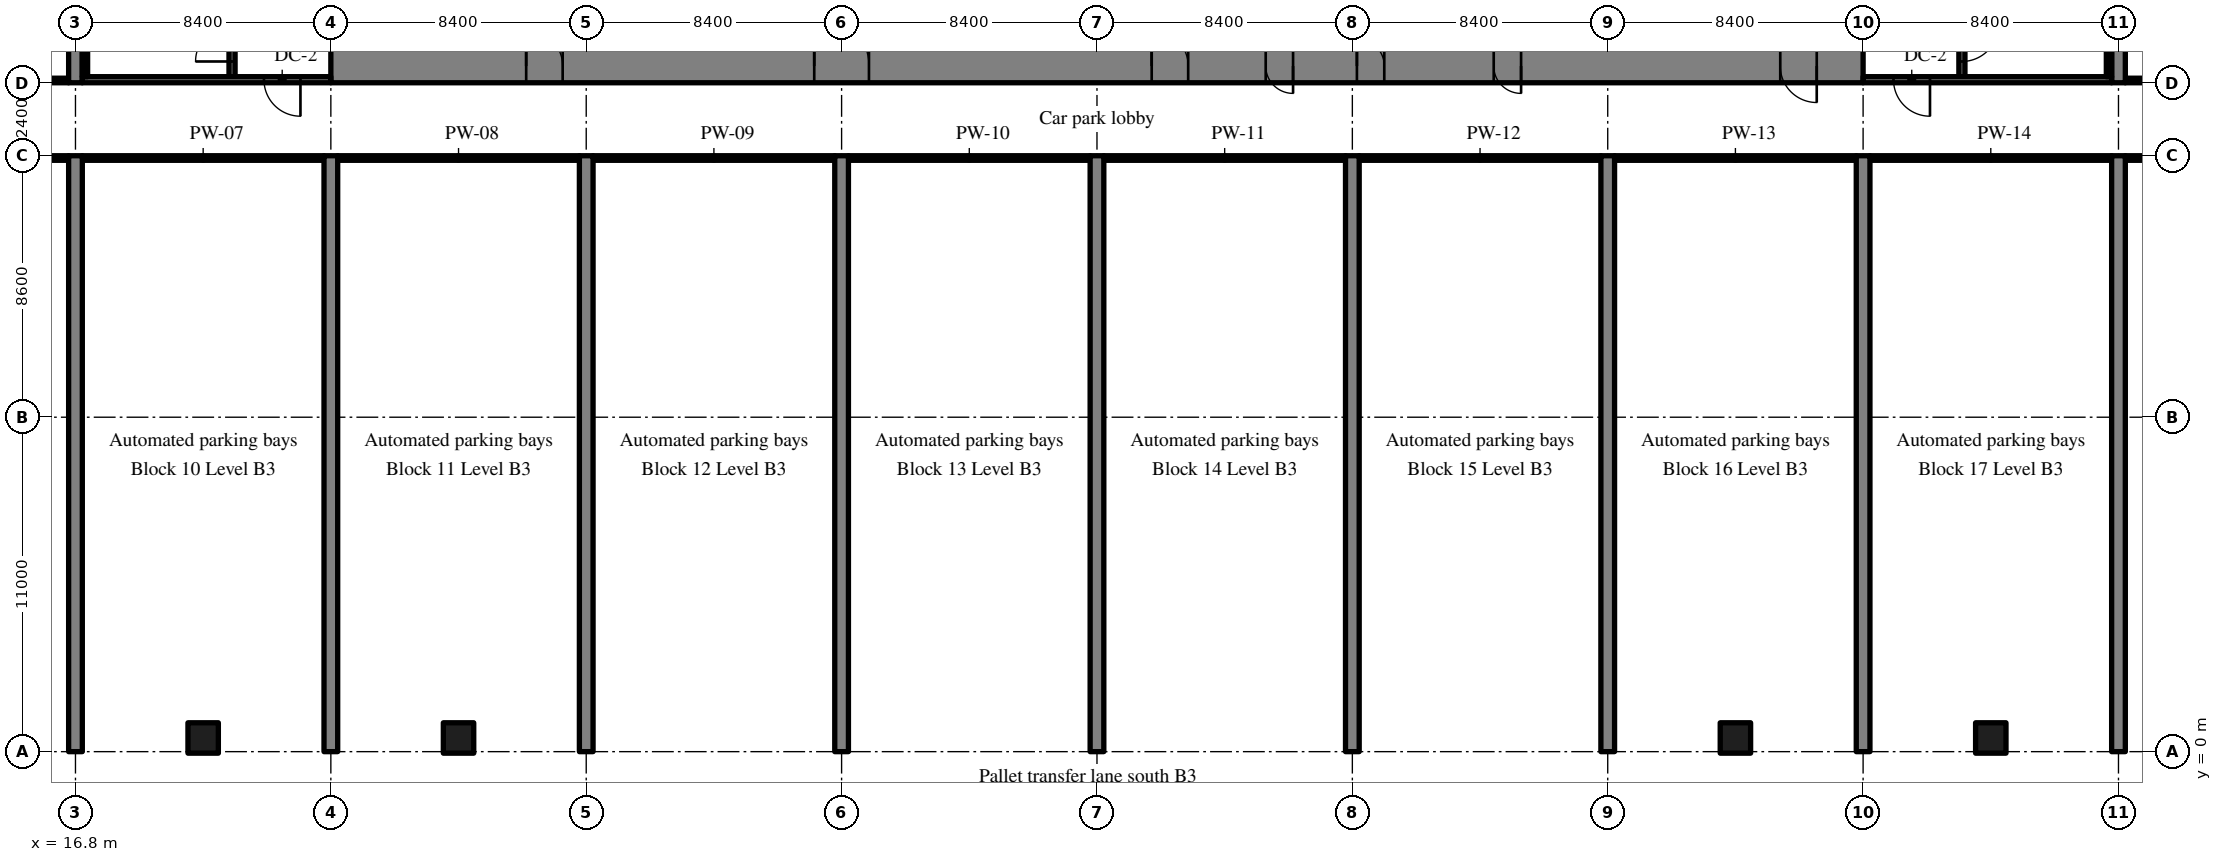
"""IFC4 building model, lengths in metres.
Left out: names, types, materials, properties, quantities, classifications, styles, units other than length and angle.
Written with IfcOpenShell. Run it as: python <this file> out.ifc"""

import sys

from ifc_helpers import new_model, si_unit, direction, frame, frame_2d, origin, origin_2d, place, context, subcontext, project, spatial, rectangle, extrude, source, transform, mapped, element, fill, save


model = new_model("IFC4")
c1 = context("Model", 3, precision=1e-05, world=origin(), true_north=direction((0.0, 1.0)))
c2 = subcontext(c1, "Body", "Model", "MODEL_VIEW")
j1 = project(units=[si_unit("LENGTHUNIT", "METRE"), si_unit("PLANEANGLEUNIT", "RADIAN")], contexts=[c1])
p1 = place(None, origin())
s1 = spatial("IfcSite", under=j1, at=p1, CompositionType="ELEMENT")
p2 = place(p1, origin())
s2 = spatial("IfcBuilding", under=s1, at=p2, CompositionType="ELEMENT")
p3 = place(p2, frame((0.0, 0.0, -13.5)))
s3 = spatial("IfcBuildingStorey", under=s2, at=p3, CompositionType="ELEMENT", Elevation=-13.5)
m1 = source(origin(), c2, "Body", "SweptSolid", [
    extrude(rectangle(XDim=50.4, YDim=1.1, at=frame_2d((25.2, 0.0))), origin(), (0.0, 0.0, 1.0), 4.52),
])
p4 = place(p3, frame((25.2, 22.55, -0.3), z_axis=(0.0, 0.0, 1.0), x_axis=(1.0, 0.0, 0.0)))
e1 = element("IfcWall", 1, at=p4, inside=s3, PredefinedType="SHEAR", context=c2, shape_type="MappedRepresentation", body=[
    mapped(m1, transform((0.0, 0.0, 0.0), scale=1.0)),
])
m2 = source(origin(), c2, "Body", "SweptSolid", [
    extrude(rectangle(XDim=1.8, YDim=2.1, at=frame_2d((0.9, 1.05))), frame((0.0, 0.56, 0.0), z_axis=(0.0, -1.0, 0.0), x_axis=(1.0, 0.0, 0.0)), (0.0, 0.0, 1.0), 1.12),
])
p5 = place(p4, frame((15.9, 0.0, 0.0)))
e2 = element("IfcOpeningElement", 2, at=p5, cuts=e1, PredefinedType="OPENING", context=c2, shape_type="MappedRepresentation", body=[
    mapped(m2, transform((0.0, 0.0, 0.0), scale=1.0)),
])
m3 = source(origin(), c2, "Body", "SweptSolid", [
    extrude(rectangle(XDim=1.2, YDim=2.1, at=frame_2d((0.6, 1.05))), frame((0.0, 0.56, 0.0), z_axis=(0.0, -1.0, 0.0), x_axis=(1.0, 0.0, 0.0)), (0.0, 0.0, 1.0), 1.12),
])
p6 = place(p4, frame((27.0, 0.0, 0.0)))
e3 = element("IfcOpeningElement", 3, at=p6, cuts=e1, PredefinedType="OPENING", context=c2, shape_type="MappedRepresentation", body=[
    mapped(m3, transform((0.0, 0.0, 0.0), scale=1.0)),
])
m4 = source(origin(), c2, "Body", "SweptSolid", [
    extrude(rectangle(XDim=0.9, YDim=2.1, at=frame_2d((0.45, 1.05))), frame((0.0, 0.56, 0.0), z_axis=(0.0, -1.0, 0.0), x_axis=(1.0, 0.0, 0.0)), (0.0, 0.0, 1.0), 1.12),
])
p7 = place(p4, frame((33.75, 0.0, 0.0)))
e4 = element("IfcOpeningElement", 4, at=p7, cuts=e1, PredefinedType="OPENING", context=c2, shape_type="MappedRepresentation", body=[
    mapped(m4, transform((0.0, 0.0, 0.0), scale=1.0)),
])
p8 = place(p4, frame((30.75, 0.0, 0.0)))
e5 = element("IfcOpeningElement", 5, at=p8, cuts=e1, PredefinedType="OPENING", context=c2, shape_type="MappedRepresentation", body=[
    mapped(m4, transform((0.0, 0.0, 0.0), scale=1.0)),
])
p9 = place(p4, frame((38.25, 0.0, 0.0)))
e6 = element("IfcOpeningElement", 6, at=p9, cuts=e1, PredefinedType="OPENING", context=c2, shape_type="MappedRepresentation", body=[
    mapped(m4, transform((0.0, 0.0, 0.0), scale=1.0)),
])
p10 = place(p4, frame((6.425, 0.0, 0.0)))
e7 = element("IfcOpeningElement", 7, at=p10, cuts=e1, PredefinedType="OPENING", context=c2, shape_type="MappedRepresentation", body=[
    mapped(m3, transform((0.0, 0.0, 0.0), scale=1.0)),
])
p11 = place(p4, frame((47.675, 0.0, 0.0)))
e8 = element("IfcOpeningElement", 8, at=p11, cuts=e1, PredefinedType="OPENING", context=c2, shape_type="MappedRepresentation", body=[
    mapped(m3, transform((0.0, 0.0, 0.0), scale=1.0)),
])
m5 = source(origin(), c2, "Body", "SweptSolid", [
    extrude(rectangle(XDim=19.6, YDim=0.45, at=frame_2d((9.8, 0.0))), origin(), (0.0, 0.0, 1.0), 4.52),
])
p12 = place(p3, frame((16.8, 0.0, -0.3), z_axis=(0.0, 0.0, 1.0), x_axis=(0.0, 1.0, 0.0)))
e9 = element("IfcWall", 9, at=p12, inside=s3, PredefinedType="SHEAR", context=c2, shape_type="MappedRepresentation", body=[
    mapped(m5, transform((0.0, 0.0, 0.0), scale=1.0)),
])
m6 = source(origin(), c2, "Body", "SweptSolid", [
    extrude(rectangle(XDim=20.0, YDim=0.45, at=frame_2d((10.0, 0.0))), origin(), (0.0, 0.0, 1.0), 4.52),
])
p13 = place(p3, frame((16.8, 22.0, -0.3), z_axis=(0.0, 0.0, 1.0), x_axis=(0.0, 1.0, 0.0)))
e10 = element("IfcWall", 10, at=p13, inside=s3, PredefinedType="SHEAR", context=c2, shape_type="MappedRepresentation", body=[
    mapped(m6, transform((0.0, 0.0, 0.0), scale=1.0)),
])
for number, where, z_axis, x_axis in (
    (11, (25.2, 0.0, -0.3), (0.0, 0.0, 1.0), (0.0, 1.0, 0.0)),
    (12, (33.6, 0.0, -0.3), (0.0, 0.0, 1.0), (0.0, 1.0, 0.0)),
    (13, (42.0, 0.0, -0.3), (0.0, 0.0, 1.0), (0.0, 1.0, 0.0)),
    (14, (50.4, 0.0, -0.3), (0.0, 0.0, 1.0), (0.0, 1.0, 0.0)),
    (15, (58.8, 0.0, -0.3), (0.0, 0.0, 1.0), (0.0, 1.0, 0.0)),
    (16, (67.2, 0.0, -0.3), (0.0, 0.0, 1.0), (0.0, 1.0, 0.0)),
    (17, (75.6, 0.0, -0.3), (0.0, 0.0, 1.0), (0.0, 1.0, 0.0)),
    (18, (84.0, 0.0, -0.3), (0.0, 0.0, 1.0), (0.0, 1.0, 0.0)),
):
    element("IfcWall", number, at=place(p3, frame(where, z_axis=z_axis, x_axis=x_axis)), inside=s3, PredefinedType="SHEAR", context=c2, shape_type="MappedRepresentation", body=[
        mapped(m5, transform((0.0, 0.0, 0.0), scale=1.0)),
    ])
p14 = place(p3, frame((84.0, 22.0, -0.3), z_axis=(0.0, 0.0, 1.0), x_axis=(0.0, 1.0, 0.0)))
e19 = element("IfcWall", 19, at=p14, inside=s3, PredefinedType="SHEAR", context=c2, shape_type="MappedRepresentation", body=[
    mapped(m6, transform((0.0, 0.0, 0.0), scale=1.0)),
])
m7 = source(origin(), c2, "Body", "SweptSolid", [
    extrude(rectangle(XDim=1.0, YDim=1.0, at=origin_2d()), origin(), (0.0, 0.0, 1.0), 4.52),
])
for number, where, z_axis, x_axis in (
    (20, (21.0, 0.45, -0.3), (0.0, 0.0, 1.0), (1.0, 0.0, 0.0)),
    (21, (29.4, 0.45, -0.3), (0.0, 0.0, 1.0), (1.0, 0.0, 0.0)),
    (22, (71.4, 0.45, -0.3), (0.0, 0.0, 1.0), (1.0, 0.0, 0.0)),
    (23, (79.8, 0.45, -0.3), (0.0, 0.0, 1.0), (1.0, 0.0, 0.0)),
):
    element("IfcColumn", number, at=place(p3, frame(where, z_axis=z_axis, x_axis=x_axis)), inside=s3, PredefinedType="COLUMN", context=c2, shape_type="MappedRepresentation", body=[
        mapped(m7, transform((0.0, 0.0, 0.0), scale=1.0)),
    ])
m8 = source(origin(), c2, "Body", "SweptSolid", [
    extrude(rectangle(XDim=8.3, YDim=0.2, at=frame_2d((4.15, 0.0))), origin(), (0.0, 0.0, 1.0), 4.52),
])
p15 = place(p3, frame((21.95, 22.1, -0.3), z_axis=(0.0, 0.0, 1.0), x_axis=(0.0, 1.0, 0.0)))
e24 = element("IfcWall", 24, at=p15, inside=s3, PredefinedType="SOLIDWALL", context=c2, shape_type="MappedRepresentation", body=[
    mapped(m8, transform((0.0, 0.0, 0.0), scale=1.0)),
])
m9 = source(origin(), c2, "Body", "SweptSolid", [
    extrude(rectangle(XDim=1.2, YDim=2.1, at=frame_2d((0.6, 1.05))), frame((0.0, 0.11, 0.0), z_axis=(0.0, -1.0, 0.0), x_axis=(1.0, 0.0, 0.0)), (0.0, 0.0, 1.0), 0.22),
])
p16 = place(p15, frame((0.6, 0.0, 0.0)))
e25 = element("IfcOpeningElement", 25, at=p16, cuts=e24, PredefinedType="OPENING", context=c2, shape_type="MappedRepresentation", body=[
    mapped(m9, transform((0.0, 0.0, 0.0), scale=1.0)),
])
m10 = source(origin(), c2, "Body", "SweptSolid", [
    extrude(rectangle(XDim=8.175, YDim=0.2, at=frame_2d((4.087, 0.0))), origin(), (0.0, 0.0, 1.0), 4.52),
])
p17 = place(p3, frame((17.025, 22.1, -0.3), z_axis=(0.0, 0.0, 1.0), x_axis=(1.0, 0.0, 0.0)))
e26 = element("IfcWall", 26, at=p17, inside=s3, PredefinedType="SOLIDWALL", context=c2, shape_type="MappedRepresentation", body=[
    mapped(m10, transform((0.0, 0.0, 0.0), scale=1.0)),
])
p18 = place(p17, frame((5.975, 0.0, 0.0)))
e27 = element("IfcOpeningElement", 27, at=p18, cuts=e26, PredefinedType="OPENING", context=c2, shape_type="MappedRepresentation", body=[
    mapped(m9, transform((0.0, 0.0, 0.0), scale=1.0)),
])
p19 = place(p3, frame((78.85, 22.1, -0.3), z_axis=(0.0, 0.0, 1.0), x_axis=(0.0, 1.0, 0.0)))
e28 = element("IfcWall", 28, at=p19, inside=s3, PredefinedType="SOLIDWALL", context=c2, shape_type="MappedRepresentation", body=[
    mapped(m8, transform((0.0, 0.0, 0.0), scale=1.0)),
])
p20 = place(p19, frame((0.6, 0.0, 0.0)))
e29 = element("IfcOpeningElement", 29, at=p20, cuts=e28, PredefinedType="OPENING", context=c2, shape_type="MappedRepresentation", body=[
    mapped(m9, transform((0.0, 0.0, 0.0), scale=1.0)),
])
m11 = source(origin(), c2, "Body", "SweptSolid", [
    extrude(rectangle(XDim=8.175, YDim=0.2, at=frame_2d((4.087, 0.0))), origin(), (0.0, 0.0, 1.0), 4.52),
])
p21 = place(p3, frame((83.775, 22.1, -0.3), z_axis=(0.0, 0.0, 1.0), x_axis=(-1.0, 0.0, 0.0)))
e30 = element("IfcWall", 30, at=p21, inside=s3, PredefinedType="SOLIDWALL", context=c2, shape_type="MappedRepresentation", body=[
    mapped(m11, transform((0.0, 0.0, 0.0), scale=1.0)),
])
p22 = place(p21, frame((5.975, 0.0, 0.0)))
e31 = element("IfcOpeningElement", 31, at=p22, cuts=e30, PredefinedType="OPENING", context=c2, shape_type="MappedRepresentation", body=[
    mapped(m9, transform((0.0, 0.0, 0.0), scale=1.0)),
])
m12 = source(origin(), c2, "Body", "SweptSolid", [
    extrude(rectangle(XDim=8.1, YDim=0.175, at=frame_2d((4.05, 0.0))), origin(), (0.0, 0.0, 1.0), 4.52),
])
for number, where, z_axis, x_axis in (
    (32, (17.112, 22.2, -0.3), (0.0, 0.0, 1.0), (0.0, 1.0, 0.0)),
    (33, (83.688, 22.2, -0.3), (0.0, 0.0, 1.0), (0.0, 1.0, 0.0)),
):
    element("IfcWall", number, at=place(p3, frame(where, z_axis=z_axis, x_axis=x_axis)), inside=s3, PredefinedType="SOLIDWALL", context=c2, shape_type="MappedRepresentation", body=[
        mapped(m12, transform((0.0, 0.0, 0.0), scale=1.0)),
    ])
m13 = source(origin(), c2, "Body", "SweptSolid", [
    extrude(rectangle(XDim=7.95, YDim=0.15, at=frame_2d((3.975, 0.0))), origin(), (0.0, 0.0, 1.0), 4.22),
])
for number, where, z_axis, x_axis in (
    (34, (8.625, 19.525, 0.0), (0.0, 0.0, 1.0), (1.0, 0.0, 0.0)),
    (35, (8.625, 22.075, 0.0), (0.0, 0.0, 1.0), (1.0, 0.0, 0.0)),
):
    element("IfcWall", number, at=place(p3, frame(where, z_axis=z_axis, x_axis=x_axis)), inside=s3, PredefinedType="PARTITIONING", context=c2, shape_type="MappedRepresentation", body=[
        mapped(m13, transform((0.0, 0.0, 0.0), scale=1.0)),
    ])
m14 = source(origin(), c2, "Body", "SweptSolid", [
    extrude(rectangle(XDim=7.95, YDim=0.15, at=frame_2d((3.975, 0.0))), origin(), (0.0, 0.0, 1.0), 4.22),
])
p23 = place(p3, frame((17.025, 19.525, 0.0), z_axis=(0.0, 0.0, 1.0), x_axis=(1.0, 0.0, 0.0)))
e36 = element("IfcWall", 36, at=p23, inside=s3, PredefinedType="PARTITIONING", context=c2, shape_type="MappedRepresentation", body=[
    mapped(m14, transform((0.0, 0.0, 0.0), scale=1.0)),
])
for number, where, z_axis, x_axis in (
    (37, (25.425, 19.525, 0.0), (0.0, 0.0, 1.0), (1.0, 0.0, 0.0)),
    (38, (33.825, 19.525, 0.0), (0.0, 0.0, 1.0), (1.0, 0.0, 0.0)),
    (39, (42.225, 19.525, 0.0), (0.0, 0.0, 1.0), (1.0, 0.0, 0.0)),
    (40, (50.625, 19.525, 0.0), (0.0, 0.0, 1.0), (1.0, 0.0, 0.0)),
):
    element("IfcWall", number, at=place(p3, frame(where, z_axis=z_axis, x_axis=x_axis)), inside=s3, PredefinedType="PARTITIONING", context=c2, shape_type="MappedRepresentation", body=[
        mapped(m13, transform((0.0, 0.0, 0.0), scale=1.0)),
    ])
p24 = place(p3, frame((59.025, 19.525, 0.0), z_axis=(0.0, 0.0, 1.0), x_axis=(1.0, 0.0, 0.0)))
e41 = element("IfcWall", 41, at=p24, inside=s3, PredefinedType="PARTITIONING", context=c2, shape_type="MappedRepresentation", body=[
    mapped(m14, transform((0.0, 0.0, 0.0), scale=1.0)),
])
for number, where, z_axis, x_axis in (
    (42, (67.425, 19.525, 0.0), (0.0, 0.0, 1.0), (1.0, 0.0, 0.0)),
    (43, (75.825, 19.525, 0.0), (0.0, 0.0, 1.0), (1.0, 0.0, 0.0)),
    (44, (84.225, 19.525, 0.0), (0.0, 0.0, 1.0), (1.0, 0.0, 0.0)),
    (45, (84.225, 22.075, 0.0), (0.0, 0.0, 1.0), (1.0, 0.0, 0.0)),
):
    element("IfcWall", number, at=place(p3, frame(where, z_axis=z_axis, x_axis=x_axis)), inside=s3, PredefinedType="PARTITIONING", context=c2, shape_type="MappedRepresentation", body=[
        mapped(m13, transform((0.0, 0.0, 0.0), scale=1.0)),
    ])
m15 = source(origin(), c2, "Body", "SweptSolid", [
    extrude(rectangle(XDim=1.8, YDim=2.1, at=frame_2d((0.9, 1.05))), frame((0.0, 0.325, 0.0), z_axis=(0.0, -1.0, 0.0), x_axis=(1.0, 0.0, 0.0)), (0.0, 0.0, 1.0), 0.05),
])
p25 = place(p5, origin())
e46 = element("IfcDoor", 46, at=p25, inside=s3, OperationType="DOUBLE_DOOR_SINGLE_SWING", PredefinedType="DOOR", context=c2, shape_type="MappedRepresentation", body=[
    mapped(m15, transform((0.0, 0.0, 0.0), scale=1.0)),
])
fill(e2, e46)
m16 = source(origin(), c2, "Body", "SweptSolid", [
    extrude(rectangle(XDim=1.2, YDim=2.1, at=frame_2d((0.6, 1.05))), frame((0.0, 0.325, 0.0), z_axis=(0.0, -1.0, 0.0), x_axis=(1.0, 0.0, 0.0)), (0.0, 0.0, 1.0), 0.05),
])
p26 = place(p6, origin())
e47 = element("IfcDoor", 47, at=p26, inside=s3, OperationType="SINGLE_SWING_LEFT", PredefinedType="DOOR", context=c2, shape_type="MappedRepresentation", body=[
    mapped(m16, transform((0.0, 0.0, 0.0), scale=1.0)),
])
fill(e3, e47)
m17 = source(origin(), c2, "Body", "SweptSolid", [
    extrude(rectangle(XDim=0.9, YDim=2.1, at=frame_2d((0.45, 1.05))), frame((0.0, 0.325, 0.0), z_axis=(0.0, -1.0, 0.0), x_axis=(1.0, 0.0, 0.0)), (0.0, 0.0, 1.0), 0.05),
])
p27 = place(p7, origin())
e48 = element("IfcDoor", 48, at=p27, inside=s3, OperationType="SINGLE_SWING_LEFT", PredefinedType="DOOR", context=c2, shape_type="MappedRepresentation", body=[
    mapped(m17, transform((0.0, 0.0, 0.0), scale=1.0)),
])
fill(e4, e48)
p28 = place(p8, origin())
e49 = element("IfcDoor", 49, at=p28, inside=s3, OperationType="SINGLE_SWING_RIGHT", PredefinedType="DOOR", context=c2, shape_type="MappedRepresentation", body=[
    mapped(m17, transform((0.0, 0.0, 0.0), scale=1.0)),
])
fill(e5, e49)
p29 = place(p9, origin())
e50 = element("IfcDoor", 50, at=p29, inside=s3, OperationType="SINGLE_SWING_RIGHT", PredefinedType="DOOR", context=c2, shape_type="MappedRepresentation", body=[
    mapped(m17, transform((0.0, 0.0, 0.0), scale=1.0)),
])
fill(e6, e50)
p30 = place(p10, origin())
e51 = element("IfcDoor", 51, at=p30, inside=s3, OperationType="SINGLE_SWING_LEFT", PredefinedType="DOOR", context=c2, shape_type="MappedRepresentation", body=[
    mapped(m16, transform((0.0, 0.0, 0.0), scale=1.0)),
])
fill(e7, e51)
p31 = place(p11, origin())
e52 = element("IfcDoor", 52, at=p31, inside=s3, OperationType="SINGLE_SWING_RIGHT", PredefinedType="DOOR", context=c2, shape_type="MappedRepresentation", body=[
    mapped(m16, transform((0.0, 0.0, 0.0), scale=1.0)),
])
fill(e8, e52)
m18 = source(origin(), c2, "Body", "SweptSolid", [
    extrude(rectangle(XDim=1.2, YDim=2.1, at=frame_2d((0.6, 1.05))), frame((0.0, 0.025, 0.0), z_axis=(0.0, -1.0, 0.0), x_axis=(1.0, 0.0, 0.0)), (0.0, 0.0, 1.0), 0.05),
])
p32 = place(p16, origin())
e53 = element("IfcDoor", 53, at=p32, inside=s3, OperationType="SINGLE_SWING_LEFT", PredefinedType="DOOR", context=c2, shape_type="MappedRepresentation", body=[
    mapped(m18, transform((0.0, 0.0, 0.0), scale=1.0)),
])
fill(e25, e53)
p33 = place(p18, origin())
e54 = element("IfcDoor", 54, at=p33, inside=s3, OperationType="SINGLE_SWING_RIGHT", PredefinedType="DOOR", context=c2, shape_type="MappedRepresentation", body=[
    mapped(m18, transform((0.0, 0.0, 0.0), scale=1.0)),
])
fill(e27, e54)
p34 = place(p20, origin())
e55 = element("IfcDoor", 55, at=p34, inside=s3, OperationType="SINGLE_SWING_RIGHT", PredefinedType="DOOR", context=c2, shape_type="MappedRepresentation", body=[
    mapped(m18, transform((0.0, 0.0, 0.0), scale=1.0)),
])
fill(e29, e55)
p35 = place(p22, origin())
e56 = element("IfcDoor", 56, at=p35, inside=s3, OperationType="SINGLE_SWING_LEFT", PredefinedType="DOOR", context=c2, shape_type="MappedRepresentation", body=[
    mapped(m18, transform((0.0, 0.0, 0.0), scale=1.0)),
])
fill(e31, e56)
save(model, sys.argv[1])
